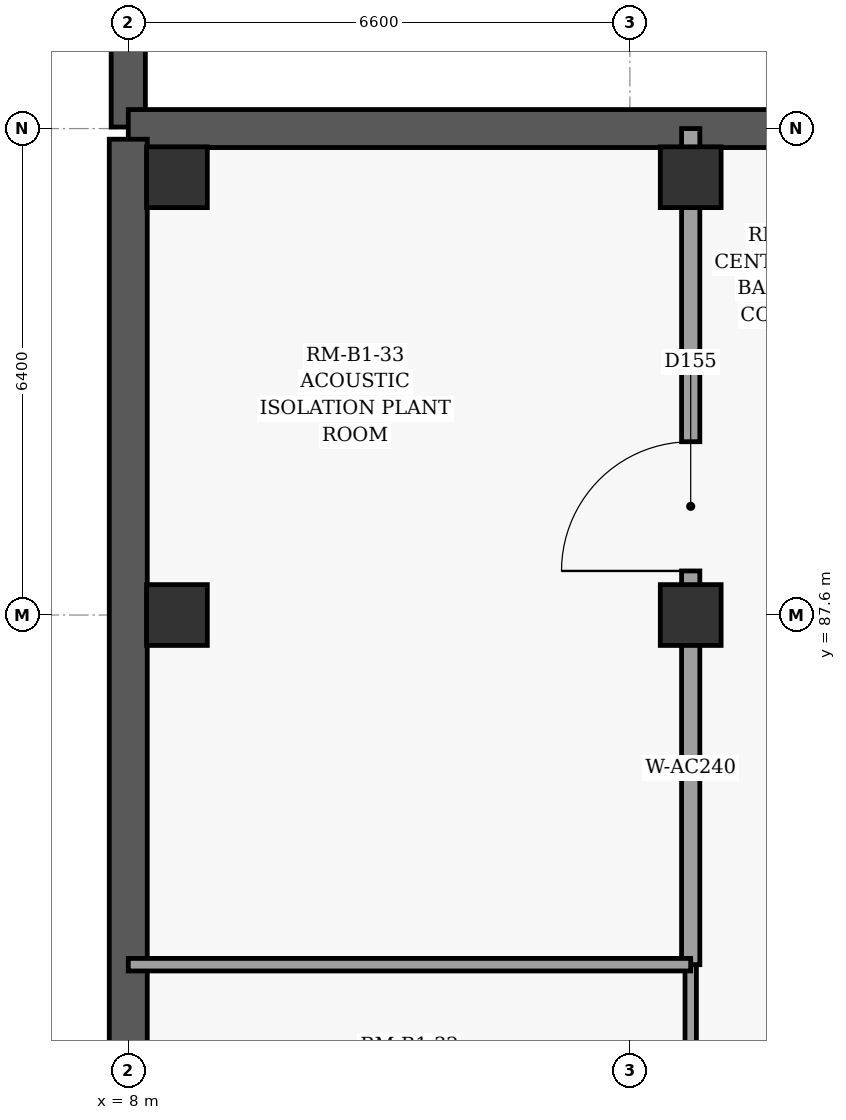
"""IFC4 building model, lengths in metres.
Left out: names, types, materials, properties, quantities, classifications, styles, units other than length and angle.
Written with IfcOpenShell. Run it as: python <this file> out.ifc"""

import sys

from ifc_helpers import new_model, si_unit, direction, frame, frame_2d, origin, origin_2d, place, context, subcontext, project, spatial, rectangle, extrude, element, fill, save


model = new_model("IFC4")
c1 = context("Model", 3, precision=1e-05, world=origin(), true_north=direction((0.0, 1.0)))
c2 = subcontext(c1, "Body", "Model", "MODEL_VIEW")
j1 = project(units=[si_unit("LENGTHUNIT", "METRE"), si_unit("PLANEANGLEUNIT", "RADIAN")], contexts=[c1])
p1 = place(None, origin())
s1 = spatial("IfcSite", under=j1, at=p1, CompositionType="ELEMENT")
p2 = place(p1, origin())
s2 = spatial("IfcBuilding", under=s1, at=p2, CompositionType="ELEMENT")
p3 = place(p2, frame((0.0, 0.0, -4.8)))
s3 = spatial("IfcBuildingStorey", under=s2, at=p3, CompositionType="ELEMENT", Elevation=-4.8)
for number, where, z_axis, x_axis in (
    (1, (8.64, 87.6, 0.0), (0.0, 0.0, 1.0), (1.0, 0.0, 0.0)),
    (2, (8.64, 93.36, 0.0), (0.0, 0.0, 1.0), (1.0, 0.0, 0.0)),
    (3, (15.4, 87.6, 0.0), (0.0, 0.0, 1.0), (1.0, 0.0, 0.0)),
    (4, (15.4, 93.36, 0.0), (0.0, 0.0, 1.0), (1.0, 0.0, 0.0)),
):
    element("IfcColumn", number, at=place(p3, frame(where, z_axis=z_axis, x_axis=x_axis)), inside=s3, PredefinedType="COLUMN", context=c2, shape_type="SweptSolid", body=[
        extrude(rectangle(XDim=0.8, YDim=0.8, at=origin_2d()), origin(), (0.0, 0.0, 1.0), 4.8),
    ])
p4 = place(p3, frame((8.0, 94.02, 0.0), z_axis=(0.0, 0.0, 1.0), x_axis=(0.0, 1.0, 0.0)))
e5 = element("IfcWall", 5, at=p4, inside=s3, PredefinedType="USERDEFINED", context=c2, shape_type="SweptSolid", body=[
    extrude(rectangle(XDim=7.96, YDim=0.45, at=frame_2d((3.98, 0.0))), origin(), (0.0, 0.0, 1.0), 4.53),
])
p5 = place(p3, frame((8.0, 94.0, 0.0), z_axis=(0.0, 0.0, 1.0), x_axis=(1.0, 0.0, 0.0)))
e6 = element("IfcWall", 6, at=p5, inside=s3, PredefinedType="USERDEFINED", context=c2, shape_type="SweptSolid", body=[
    extrude(rectangle(XDim=32.2, YDim=0.5, at=frame_2d((16.1, 0.0))), origin(), (0.0, 0.0, 1.0), 4.5),
])
p6 = place(p3, frame((8.0, 64.14, 0.0), z_axis=(0.0, 0.0, 1.0), x_axis=(0.0, 1.0, 0.0)))
e7 = element("IfcWall", 7, at=p6, inside=s3, PredefinedType="USERDEFINED", context=c2, shape_type="SweptSolid", body=[
    extrude(rectangle(XDim=29.72, YDim=0.5, at=frame_2d((14.86, 0.0))), origin(), (0.0, 0.0, 1.0), 4.5),
])
p7 = place(p3, frame((15.4, 72.002, 0.0), z_axis=(0.0, 0.0, 1.0), x_axis=(0.0, 1.0, 0.0)))
e8 = element("IfcWall", 8, at=p7, inside=s3, PredefinedType="PARTITIONING", context=c2, shape_type="SweptSolid", body=[
    extrude(rectangle(XDim=10.998, YDim=0.15, at=frame_2d((5.499, 0.0))), origin(), (0.0, 0.0, 1.0), 3.65),
])
p8 = place(p7, frame((4.674, 0.0, 0.0)))
e9 = element("IfcOpeningElement", 9, at=p8, cuts=e8, PredefinedType="OPENING", context=c2, shape_type="SweptSolid", body=[
    extrude(rectangle(XDim=1.65, YDim=2.3, at=frame_2d((0.825, 1.15))), frame((0.0, 0.085, 0.0), z_axis=(0.0, -1.0, 0.0), x_axis=(1.0, 0.0, 0.0)), (0.0, 0.0, 1.0), 0.17),
])
p9 = place(p3, frame((15.4, 83.0, 0.0), z_axis=(0.0, 0.0, 1.0), x_axis=(0.0, 1.0, 0.0)))
e10 = element("IfcWall", 10, at=p9, inside=s3, PredefinedType="PARTITIONING", context=c2, shape_type="SweptSolid", body=[
    extrude(rectangle(XDim=11.0, YDim=0.24, at=frame_2d((5.5, 0.0))), origin(), (0.0, 0.0, 1.0), 3.65),
])
p10 = place(p9, frame((5.18, 0.0, 0.0)))
e11 = element("IfcOpeningElement", 11, at=p10, cuts=e10, PredefinedType="OPENING", context=c2, shape_type="SweptSolid", body=[
    extrude(rectangle(XDim=1.7, YDim=2.3, at=frame_2d((0.85, 1.15))), frame((0.0, 0.13, 0.0), z_axis=(0.0, -1.0, 0.0), x_axis=(1.0, 0.0, 0.0)), (0.0, 0.0, 1.0), 0.26),
])
p11 = place(p3, frame((8.0, 83.0, 0.0), z_axis=(0.0, 0.0, 1.0), x_axis=(1.0, 0.0, 0.0)))
e12 = element("IfcWall", 12, at=p11, inside=s3, PredefinedType="PARTITIONING", context=c2, shape_type="SweptSolid", body=[
    extrude(rectangle(XDim=7.4, YDim=0.165, at=frame_2d((3.7, 0.0))), origin(), (0.0, 0.0, 1.0), 4.5),
])
p12 = place(p10, origin())
e13 = element("IfcDoor", 13, at=p12, inside=s3, OperationType="SINGLE_SWING_LEFT", PredefinedType="DOOR", context=c2, shape_type="SweptSolid", body=[
    extrude(rectangle(XDim=1.7, YDim=2.3, at=frame_2d((0.85, 1.15))), frame((0.0, 0.025, 0.0), z_axis=(0.0, -1.0, 0.0), x_axis=(1.0, 0.0, 0.0)), (0.0, 0.0, 1.0), 0.05),
])
fill(e11, e13)
save(model, sys.argv[1])
